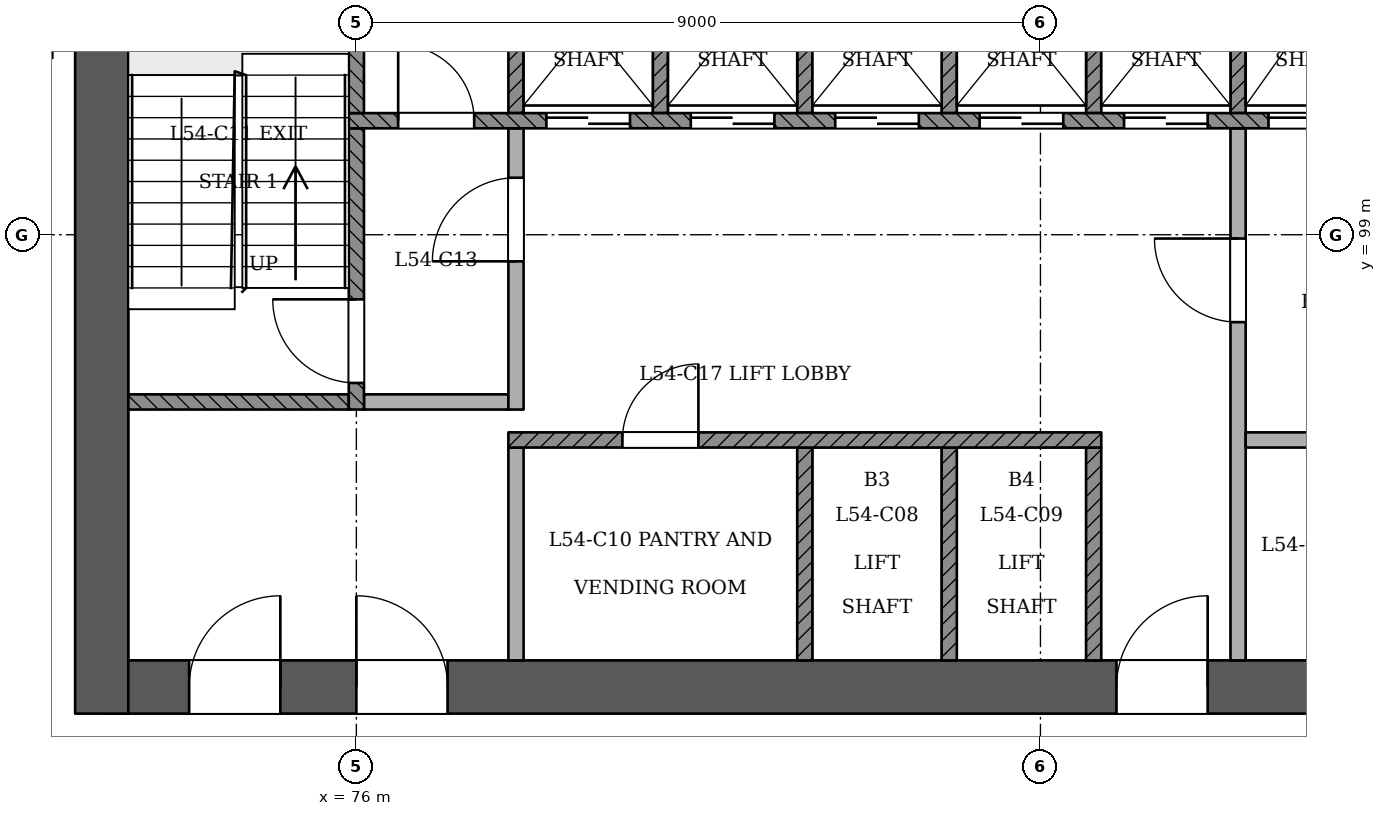
"""IFC4 building model, lengths in metres.
Left out: names, types, materials, properties, quantities, classifications, styles, units other than length and angle.
Written with IfcOpenShell. Run it as: python <this file> out.ifc"""

import sys

from ifc_helpers import new_model, si_unit, direction, frame, frame_2d, origin, place, context, subcontext, project, spatial, rectangle, extrude, element, fill, save


model = new_model("IFC4")
c1 = context("Model", 3, precision=1e-05, world=origin(), true_north=direction((0.0, 1.0)))
c2 = subcontext(c1, "Body", "Model", "MODEL_VIEW")
j1 = project(units=[si_unit("LENGTHUNIT", "METRE"), si_unit("PLANEANGLEUNIT", "RADIAN")], contexts=[c1])
p1 = place(None, origin())
s1 = spatial("IfcSite", under=j1, at=p1, CompositionType="ELEMENT")
p2 = place(p1, origin())
s2 = spatial("IfcBuilding", under=s1, at=p2, CompositionType="ELEMENT")
p3 = place(p2, frame((0.0, 0.0, 208.8)))
s3 = spatial("IfcBuildingStorey", under=s2, at=p3, CompositionType="ELEMENT", Elevation=208.8)
p4 = place(p3, frame((72.65, 93.05, 0.0), z_axis=(0.0, 0.0, 1.0), x_axis=(1.0, 0.0, 0.0)))
e1 = element("IfcWall", 1, at=p4, inside=s3, PredefinedType="SHEAR", context=c2, shape_type="SweptSolid", body=[
    extrude(rectangle(XDim=25.05, YDim=0.7, at=frame_2d((12.525, 0.0))), origin(), (0.0, 0.0, 1.0), 3.6),
])
p5 = place(p4, frame((1.15, 0.0, 0.0)))
e2 = element("IfcOpeningElement", 2, at=p5, cuts=e1, PredefinedType="OPENING", context=c2, shape_type="SweptSolid", body=[
    extrude(rectangle(XDim=1.2, YDim=2.1, at=frame_2d((0.6, 1.05))), frame((0.0, 0.36, 0.0), z_axis=(0.0, -1.0, 0.0), x_axis=(1.0, 0.0, 0.0)), (0.0, 0.0, 1.0), 0.721),
])
p6 = place(p4, frame((3.35, 0.0, 0.0)))
e3 = element("IfcOpeningElement", 3, at=p6, cuts=e1, PredefinedType="OPENING", context=c2, shape_type="SweptSolid", body=[
    extrude(rectangle(XDim=1.2, YDim=2.1, at=frame_2d((0.6, 1.05))), frame((0.0, 0.36, 0.0), z_axis=(0.0, -1.0, 0.0), x_axis=(1.0, 0.0, 0.0)), (0.0, 0.0, 1.0), 0.721),
])
p7 = place(p4, frame((13.35, 0.0, 0.0)))
e4 = element("IfcOpeningElement", 4, at=p7, cuts=e1, PredefinedType="OPENING", context=c2, shape_type="SweptSolid", body=[
    extrude(rectangle(XDim=1.2, YDim=2.1, at=frame_2d((0.6, 1.05))), frame((0.0, 0.36, 0.0), z_axis=(0.0, -1.0, 0.0), x_axis=(1.0, 0.0, 0.0)), (0.0, 0.0, 1.0), 0.721),
])
p8 = place(p4, frame((16.212, 0.0, 0.0)))
e5 = element("IfcOpeningElement", 5, at=p8, cuts=e1, PredefinedType="OPENING", context=c2, shape_type="SweptSolid", body=[
    extrude(rectangle(XDim=1.0, YDim=2.1, at=frame_2d((0.5, 1.05))), frame((0.0, 0.36, 0.0), z_axis=(0.0, -1.0, 0.0), x_axis=(1.0, 0.0, 0.0)), (0.0, 0.0, 1.0), 0.721),
])
p9 = place(p4, frame((19.65, 0.0, 0.0)))
e6 = element("IfcOpeningElement", 6, at=p9, cuts=e1, PredefinedType="OPENING", context=c2, shape_type="SweptSolid", body=[
    extrude(rectangle(XDim=1.0, YDim=2.1, at=frame_2d((0.5, 1.05))), frame((0.0, 0.36, 0.0), z_axis=(0.0, -1.0, 0.0), x_axis=(1.0, 0.0, 0.0)), (0.0, 0.0, 1.0), 0.721),
])
p10 = place(p4, frame((22.637, 0.0, 0.0)))
e7 = element("IfcOpeningElement", 7, at=p10, cuts=e1, PredefinedType="OPENING", context=c2, shape_type="SweptSolid", body=[
    extrude(rectangle(XDim=1.0, YDim=2.1, at=frame_2d((0.5, 1.05))), frame((0.0, 0.36, 0.0), z_axis=(0.0, -1.0, 0.0), x_axis=(1.0, 0.0, 0.0)), (0.0, 0.0, 1.0), 0.721),
])
p11 = place(p3, frame((72.65, 103.75, 0.0), z_axis=(0.0, 0.0, 1.0), x_axis=(0.0, -1.0, 0.0)))
e8 = element("IfcWall", 8, at=p11, inside=s3, PredefinedType="SHEAR", context=c2, shape_type="SweptSolid", body=[
    extrude(rectangle(XDim=11.05, YDim=0.7, at=frame_2d((5.525, 0.0))), origin(), (0.0, 0.0, 1.0), 3.6),
])
p12 = place(p3, frame((72.0, 101.4, 0.0), z_axis=(0.0, 0.0, 1.0), x_axis=(-1.0, 0.0, 0.0)))
e9 = element("IfcWall", 9, at=p12, inside=s3, PredefinedType="PARTITIONING", context=c2, shape_type="SweptSolid", body=[
    extrude(rectangle(XDim=1.8, YDim=0.15, at=frame_2d((0.9, 0.0))), origin(), (0.0, 0.0, 1.0), 3.3),
])
p13 = place(p3, frame((78.1, 93.4, 0.0), z_axis=(0.0, 0.0, 1.0), x_axis=(0.0, 1.0, 0.0)))
e10 = element("IfcWall", 10, at=p13, inside=s3, PredefinedType="PARTITIONING", context=c2, shape_type="SweptSolid", body=[
    extrude(rectangle(XDim=2.8, YDim=0.2, at=frame_2d((1.4, 0.0))), origin(), (0.0, 0.0, 1.0), 3.3),
])
for number, where, z_axis, x_axis in (
    (11, (81.9, 93.4, 0.0), (0.0, 0.0, 1.0), (0.0, 1.0, 0.0)),
    (12, (83.8, 93.4, 0.0), (0.0, 0.0, 1.0), (0.0, 1.0, 0.0)),
    (13, (85.7, 93.4, 0.0), (0.0, 0.0, 1.0), (0.0, 1.0, 0.0)),
):
    element("IfcWall", number, at=place(p3, frame(where, z_axis=z_axis, x_axis=x_axis)), inside=s3, PredefinedType="SOLIDWALL", context=c2, shape_type="SweptSolid", body=[
        extrude(rectangle(XDim=2.8, YDim=0.2, at=frame_2d((1.4, 0.0))), origin(), (0.0, 0.0, 1.0), 3.3),
    ])
p14 = place(p3, frame((87.6, 93.4, 0.0), z_axis=(0.0, 0.0, 1.0), x_axis=(0.0, 1.0, 0.0)))
e14 = element("IfcWall", 14, at=p14, inside=s3, PredefinedType="PARTITIONING", context=c2, shape_type="SweptSolid", body=[
    extrude(rectangle(XDim=7.0, YDim=0.2, at=frame_2d((3.5, 0.0))), origin(), (0.0, 0.0, 1.0), 3.3),
])
p15 = place(p14, frame((4.45, 0.0, 0.0)))
e15 = element("IfcOpeningElement", 15, at=p15, cuts=e14, PredefinedType="OPENING", context=c2, shape_type="SweptSolid", body=[
    extrude(rectangle(XDim=1.1, YDim=2.1, at=frame_2d((0.55, 1.05))), frame((0.0, 0.11, 0.0), z_axis=(0.0, -1.0, 0.0), x_axis=(1.0, 0.0, 0.0)), (0.0, 0.0, 1.0), 0.221),
])
p16 = place(p3, frame((78.0, 96.3, 0.0), z_axis=(0.0, 0.0, 1.0), x_axis=(1.0, 0.0, 0.0)))
e16 = element("IfcWall", 16, at=p16, inside=s3, PredefinedType="SOLIDWALL", context=c2, shape_type="SweptSolid", body=[
    extrude(rectangle(XDim=7.8, YDim=0.2, at=frame_2d((3.9, 0.0))), origin(), (0.0, 0.0, 1.0), 3.3),
])
p17 = place(p16, frame((1.5, 0.0, 0.0)))
e17 = element("IfcOpeningElement", 17, at=p17, cuts=e16, PredefinedType="OPENING", context=c2, shape_type="SweptSolid", body=[
    extrude(rectangle(XDim=1.0, YDim=2.1, at=frame_2d((0.5, 1.05))), frame((0.0, 0.11, 0.0), z_axis=(0.0, -1.0, 0.0), x_axis=(1.0, 0.0, 0.0)), (0.0, 0.0, 1.0), 0.221),
])
p18 = place(p3, frame((87.7, 96.3, 0.0), z_axis=(0.0, 0.0, 1.0), x_axis=(1.0, 0.0, 0.0)))
e18 = element("IfcWall", 18, at=p18, inside=s3, PredefinedType="PARTITIONING", context=c2, shape_type="SweptSolid", body=[
    extrude(rectangle(XDim=3.6, YDim=0.2, at=frame_2d((1.8, 0.0))), origin(), (0.0, 0.0, 1.0), 3.3),
])
p19 = place(p3, frame((73.0, 96.8, 0.0), z_axis=(0.0, 0.0, 1.0), x_axis=(1.0, 0.0, 0.0)))
e19 = element("IfcWall", 19, at=p19, inside=s3, PredefinedType="SOLIDWALL", context=c2, shape_type="SweptSolid", body=[
    extrude(rectangle(XDim=2.9, YDim=0.2, at=frame_2d((1.45, 0.0))), origin(), (0.0, 0.0, 1.0), 3.3),
])
p20 = place(p3, frame((76.0, 96.7, 0.0), z_axis=(0.0, 0.0, 1.0), x_axis=(0.0, 1.0, 0.0)))
e20 = element("IfcWall", 20, at=p20, inside=s3, PredefinedType="SOLIDWALL", context=c2, shape_type="SweptSolid", body=[
    extrude(rectangle(XDim=3.7, YDim=0.2, at=frame_2d((1.85, 0.0))), origin(), (0.0, 0.0, 1.0), 3.3),
])
p21 = place(p20, frame((0.35, 0.0, 0.0)))
e21 = element("IfcOpeningElement", 21, at=p21, cuts=e20, PredefinedType="OPENING", context=c2, shape_type="SweptSolid", body=[
    extrude(rectangle(XDim=1.1, YDim=2.1, at=frame_2d((0.55, 1.05))), frame((0.0, 0.11, 0.0), z_axis=(0.0, -1.0, 0.0), x_axis=(1.0, 0.0, 0.0)), (0.0, 0.0, 1.0), 0.221),
])
p22 = place(p3, frame((76.1, 96.8, 0.0), z_axis=(0.0, 0.0, 1.0), x_axis=(1.0, 0.0, 0.0)))
e22 = element("IfcWall", 22, at=p22, inside=s3, PredefinedType="PARTITIONING", context=c2, shape_type="SweptSolid", body=[
    extrude(rectangle(XDim=1.9, YDim=0.2, at=frame_2d((0.95, 0.0))), origin(), (0.0, 0.0, 1.0), 3.3),
])
p23 = place(p3, frame((78.1, 96.7, 0.0), z_axis=(0.0, 0.0, 1.0), x_axis=(0.0, 1.0, 0.0)))
e23 = element("IfcWall", 23, at=p23, inside=s3, PredefinedType="PARTITIONING", context=c2, shape_type="SweptSolid", body=[
    extrude(rectangle(XDim=3.7, YDim=0.2, at=frame_2d((1.85, 0.0))), origin(), (0.0, 0.0, 1.0), 3.3),
])
p24 = place(p23, frame((1.95, 0.0, 0.0)))
e24 = element("IfcOpeningElement", 24, at=p24, cuts=e23, PredefinedType="OPENING", context=c2, shape_type="SweptSolid", body=[
    extrude(rectangle(XDim=1.1, YDim=2.1, at=frame_2d((0.55, 1.05))), frame((0.0, 0.11, 0.0), z_axis=(0.0, -1.0, 0.0), x_axis=(1.0, 0.0, 0.0)), (0.0, 0.0, 1.0), 0.221),
])
p25 = place(p3, frame((75.9, 100.5, 0.0), z_axis=(0.0, 0.0, 1.0), x_axis=(1.0, 0.0, 0.0)))
e25 = element("IfcWall", 25, at=p25, inside=s3, PredefinedType="SOLIDWALL", context=c2, shape_type="SweptSolid", body=[
    extrude(rectangle(XDim=18.2, YDim=0.2, at=frame_2d((9.1, 0.0))), origin(), (0.0, 0.0, 1.0), 3.3),
])
p26 = place(p25, frame((2.6, 0.0, 0.0)))
e26 = element("IfcOpeningElement", 26, at=p26, cuts=e25, PredefinedType="OPENING", context=c2, shape_type="SweptSolid", body=[
    extrude(rectangle(XDim=1.1, YDim=2.1, at=frame_2d((0.55, 1.05))), frame((0.0, 0.11, 0.0), z_axis=(0.0, -1.0, 0.0), x_axis=(1.0, 0.0, 0.0)), (0.0, 0.0, 1.0), 0.221),
])
p27 = place(p25, frame((4.5, 0.0, 0.0)))
e27 = element("IfcOpeningElement", 27, at=p27, cuts=e25, PredefinedType="OPENING", context=c2, shape_type="SweptSolid", body=[
    extrude(rectangle(XDim=1.1, YDim=2.1, at=frame_2d((0.55, 1.05))), frame((0.0, 0.11, 0.0), z_axis=(0.0, -1.0, 0.0), x_axis=(1.0, 0.0, 0.0)), (0.0, 0.0, 1.0), 0.221),
])
p28 = place(p25, frame((6.4, 0.0, 0.0)))
e28 = element("IfcOpeningElement", 28, at=p28, cuts=e25, PredefinedType="OPENING", context=c2, shape_type="SweptSolid", body=[
    extrude(rectangle(XDim=1.1, YDim=2.1, at=frame_2d((0.55, 1.05))), frame((0.0, 0.11, 0.0), z_axis=(0.0, -1.0, 0.0), x_axis=(1.0, 0.0, 0.0)), (0.0, 0.0, 1.0), 0.221),
])
p29 = place(p25, frame((8.3, 0.0, 0.0)))
e29 = element("IfcOpeningElement", 29, at=p29, cuts=e25, PredefinedType="OPENING", context=c2, shape_type="SweptSolid", body=[
    extrude(rectangle(XDim=1.1, YDim=2.1, at=frame_2d((0.55, 1.05))), frame((0.0, 0.11, 0.0), z_axis=(0.0, -1.0, 0.0), x_axis=(1.0, 0.0, 0.0)), (0.0, 0.0, 1.0), 0.221),
])
p30 = place(p25, frame((10.2, 0.0, 0.0)))
e30 = element("IfcOpeningElement", 30, at=p30, cuts=e25, PredefinedType="OPENING", context=c2, shape_type="SweptSolid", body=[
    extrude(rectangle(XDim=1.1, YDim=2.1, at=frame_2d((0.55, 1.05))), frame((0.0, 0.11, 0.0), z_axis=(0.0, -1.0, 0.0), x_axis=(1.0, 0.0, 0.0)), (0.0, 0.0, 1.0), 0.221),
])
p31 = place(p25, frame((12.1, 0.0, 0.0)))
e31 = element("IfcOpeningElement", 31, at=p31, cuts=e25, PredefinedType="OPENING", context=c2, shape_type="SweptSolid", body=[
    extrude(rectangle(XDim=1.1, YDim=2.1, at=frame_2d((0.55, 1.05))), frame((0.0, 0.11, 0.0), z_axis=(0.0, -1.0, 0.0), x_axis=(1.0, 0.0, 0.0)), (0.0, 0.0, 1.0), 0.221),
])
p32 = place(p25, frame((14.0, 0.0, 0.0)))
e32 = element("IfcOpeningElement", 32, at=p32, cuts=e25, PredefinedType="OPENING", context=c2, shape_type="SweptSolid", body=[
    extrude(rectangle(XDim=1.1, YDim=2.1, at=frame_2d((0.55, 1.05))), frame((0.0, 0.11, 0.0), z_axis=(0.0, -1.0, 0.0), x_axis=(1.0, 0.0, 0.0)), (0.0, 0.0, 1.0), 0.221),
])
p33 = place(p25, frame((0.65, 0.0, 0.0)))
e33 = element("IfcOpeningElement", 33, at=p33, cuts=e25, PredefinedType="OPENING", context=c2, shape_type="SweptSolid", body=[
    extrude(rectangle(XDim=1.0, YDim=2.1, at=frame_2d((0.5, 1.05))), frame((0.0, 0.11, 0.0), z_axis=(0.0, -1.0, 0.0), x_axis=(1.0, 0.0, 0.0)), (0.0, 0.0, 1.0), 0.221),
])
p34 = place(p25, frame((16.3, 0.0, 0.0)))
e34 = element("IfcOpeningElement", 34, at=p34, cuts=e25, PredefinedType="OPENING", context=c2, shape_type="SweptSolid", body=[
    extrude(rectangle(XDim=1.0, YDim=2.1, at=frame_2d((0.5, 1.05))), frame((0.0, 0.11, 0.0), z_axis=(0.0, -1.0, 0.0), x_axis=(1.0, 0.0, 0.0)), (0.0, 0.0, 1.0), 0.221),
])
for number, where, z_axis, x_axis in (
    (35, (76.0, 100.6, 0.0), (0.0, 0.0, 1.0), (0.0, 1.0, 0.0)),
    (36, (78.1, 100.6, 0.0), (0.0, 0.0, 1.0), (0.0, 1.0, 0.0)),
    (37, (80.0, 100.6, 0.0), (0.0, 0.0, 1.0), (0.0, 1.0, 0.0)),
    (38, (81.9, 100.6, 0.0), (0.0, 0.0, 1.0), (0.0, 1.0, 0.0)),
    (39, (83.8, 100.6, 0.0), (0.0, 0.0, 1.0), (0.0, 1.0, 0.0)),
    (40, (85.7, 100.6, 0.0), (0.0, 0.0, 1.0), (0.0, 1.0, 0.0)),
    (41, (87.6, 100.6, 0.0), (0.0, 0.0, 1.0), (0.0, 1.0, 0.0)),
):
    element("IfcWall", number, at=place(p3, frame(where, z_axis=z_axis, x_axis=x_axis)), inside=s3, PredefinedType="SOLIDWALL", context=c2, shape_type="SweptSolid", body=[
        extrude(rectangle(XDim=2.8, YDim=0.2, at=frame_2d((1.4, 0.0))), origin(), (0.0, 0.0, 1.0), 3.3),
    ])
p35 = place(p26, origin())
e42 = element("IfcDoor", 42, at=p35, inside=s3, OperationType="SLIDING_TO_RIGHT", PredefinedType="NOTDEFINED", context=c2, shape_type="SweptSolid", body=[
    extrude(rectangle(XDim=1.1, YDim=2.1, at=frame_2d((0.55, 1.05))), frame((0.0, 0.025, 0.0), z_axis=(0.0, -1.0, 0.0), x_axis=(1.0, 0.0, 0.0)), (0.0, 0.0, 1.0), 0.05),
])
fill(e26, e42)
p36 = place(p27, origin())
e43 = element("IfcDoor", 43, at=p36, inside=s3, OperationType="SLIDING_TO_LEFT", PredefinedType="NOTDEFINED", context=c2, shape_type="SweptSolid", body=[
    extrude(rectangle(XDim=1.1, YDim=2.1, at=frame_2d((0.55, 1.05))), frame((0.0, 0.025, 0.0), z_axis=(0.0, -1.0, 0.0), x_axis=(1.0, 0.0, 0.0)), (0.0, 0.0, 1.0), 0.05),
])
fill(e27, e43)
p37 = place(p28, origin())
e44 = element("IfcDoor", 44, at=p37, inside=s3, OperationType="SLIDING_TO_RIGHT", PredefinedType="NOTDEFINED", context=c2, shape_type="SweptSolid", body=[
    extrude(rectangle(XDim=1.1, YDim=2.1, at=frame_2d((0.55, 1.05))), frame((0.0, 0.025, 0.0), z_axis=(0.0, -1.0, 0.0), x_axis=(1.0, 0.0, 0.0)), (0.0, 0.0, 1.0), 0.05),
])
fill(e28, e44)
p38 = place(p29, origin())
e45 = element("IfcDoor", 45, at=p38, inside=s3, OperationType="SLIDING_TO_LEFT", PredefinedType="NOTDEFINED", context=c2, shape_type="SweptSolid", body=[
    extrude(rectangle(XDim=1.1, YDim=2.1, at=frame_2d((0.55, 1.05))), frame((0.0, 0.025, 0.0), z_axis=(0.0, -1.0, 0.0), x_axis=(1.0, 0.0, 0.0)), (0.0, 0.0, 1.0), 0.05),
])
fill(e29, e45)
p39 = place(p30, origin())
e46 = element("IfcDoor", 46, at=p39, inside=s3, OperationType="SLIDING_TO_RIGHT", PredefinedType="NOTDEFINED", context=c2, shape_type="SweptSolid", body=[
    extrude(rectangle(XDim=1.1, YDim=2.1, at=frame_2d((0.55, 1.05))), frame((0.0, 0.025, 0.0), z_axis=(0.0, -1.0, 0.0), x_axis=(1.0, 0.0, 0.0)), (0.0, 0.0, 1.0), 0.05),
])
fill(e30, e46)
p40 = place(p31, origin())
e47 = element("IfcDoor", 47, at=p40, inside=s3, OperationType="SLIDING_TO_RIGHT", PredefinedType="NOTDEFINED", context=c2, shape_type="SweptSolid", body=[
    extrude(rectangle(XDim=1.1, YDim=2.1, at=frame_2d((0.55, 1.05))), frame((0.0, 0.025, 0.0), z_axis=(0.0, -1.0, 0.0), x_axis=(1.0, 0.0, 0.0)), (0.0, 0.0, 1.0), 0.05),
])
fill(e31, e47)
p41 = place(p21, origin())
e48 = element("IfcDoor", 48, at=p41, inside=s3, OperationType="SINGLE_SWING_RIGHT", PredefinedType="NOTDEFINED", context=c2, shape_type="SweptSolid", body=[
    extrude(rectangle(XDim=1.1, YDim=2.1, at=frame_2d((0.55, 1.05))), frame((0.0, 0.025, 0.0), z_axis=(0.0, -1.0, 0.0), x_axis=(1.0, 0.0, 0.0)), (0.0, 0.0, 1.0), 0.05),
])
fill(e21, e48)
p42 = place(p24, origin())
e49 = element("IfcDoor", 49, at=p42, inside=s3, OperationType="SINGLE_SWING_LEFT", PredefinedType="NOTDEFINED", context=c2, shape_type="SweptSolid", body=[
    extrude(rectangle(XDim=1.1, YDim=2.1, at=frame_2d((0.55, 1.05))), frame((0.0, 0.025, 0.0), z_axis=(0.0, -1.0, 0.0), x_axis=(1.0, 0.0, 0.0)), (0.0, 0.0, 1.0), 0.05),
])
fill(e24, e49)
p43 = place(p15, origin())
e50 = element("IfcDoor", 50, at=p43, inside=s3, OperationType="SINGLE_SWING_RIGHT", PredefinedType="NOTDEFINED", context=c2, shape_type="SweptSolid", body=[
    extrude(rectangle(XDim=1.1, YDim=2.1, at=frame_2d((0.55, 1.05))), frame((0.0, 0.025, 0.0), z_axis=(0.0, -1.0, 0.0), x_axis=(1.0, 0.0, 0.0)), (0.0, 0.0, 1.0), 0.05),
])
fill(e15, e50)
p44 = place(p5, origin())
e51 = element("IfcDoor", 51, at=p44, inside=s3, OperationType="SINGLE_SWING_RIGHT", PredefinedType="NOTDEFINED", context=c2, shape_type="SweptSolid", body=[
    extrude(rectangle(XDim=1.2, YDim=2.1, at=frame_2d((0.6, 1.05))), frame((0.0, 0.025, 0.0), z_axis=(0.0, -1.0, 0.0), x_axis=(1.0, 0.0, 0.0)), (0.0, 0.0, 1.0), 0.05),
])
fill(e2, e51)
p45 = place(p6, origin())
e52 = element("IfcDoor", 52, at=p45, inside=s3, OperationType="SINGLE_SWING_LEFT", PredefinedType="NOTDEFINED", context=c2, shape_type="SweptSolid", body=[
    extrude(rectangle(XDim=1.2, YDim=2.1, at=frame_2d((0.6, 1.05))), frame((0.0, 0.025, 0.0), z_axis=(0.0, -1.0, 0.0), x_axis=(1.0, 0.0, 0.0)), (0.0, 0.0, 1.0), 0.05),
])
fill(e3, e52)
p46 = place(p7, origin())
e53 = element("IfcDoor", 53, at=p46, inside=s3, OperationType="SINGLE_SWING_RIGHT", PredefinedType="NOTDEFINED", context=c2, shape_type="SweptSolid", body=[
    extrude(rectangle(XDim=1.2, YDim=2.1, at=frame_2d((0.6, 1.05))), frame((0.0, 0.025, 0.0), z_axis=(0.0, -1.0, 0.0), x_axis=(1.0, 0.0, 0.0)), (0.0, 0.0, 1.0), 0.05),
])
fill(e4, e53)
p47 = place(p33, origin())
e54 = element("IfcDoor", 54, at=p47, inside=s3, OperationType="SINGLE_SWING_LEFT", PredefinedType="NOTDEFINED", context=c2, shape_type="SweptSolid", body=[
    extrude(rectangle(XDim=1.0, YDim=2.1, at=frame_2d((0.5, 1.05))), frame((0.0, 0.025, 0.0), z_axis=(0.0, -1.0, 0.0), x_axis=(1.0, 0.0, 0.0)), (0.0, 0.0, 1.0), 0.05),
])
fill(e33, e54)
p48 = place(p17, origin())
e55 = element("IfcDoor", 55, at=p48, inside=s3, OperationType="SINGLE_SWING_RIGHT", PredefinedType="NOTDEFINED", context=c2, shape_type="SweptSolid", body=[
    extrude(rectangle(XDim=1.0, YDim=2.1, at=frame_2d((0.5, 1.05))), frame((0.0, 0.025, 0.0), z_axis=(0.0, -1.0, 0.0), x_axis=(1.0, 0.0, 0.0)), (0.0, 0.0, 1.0), 0.05),
])
fill(e17, e55)
save(model, sys.argv[1])
